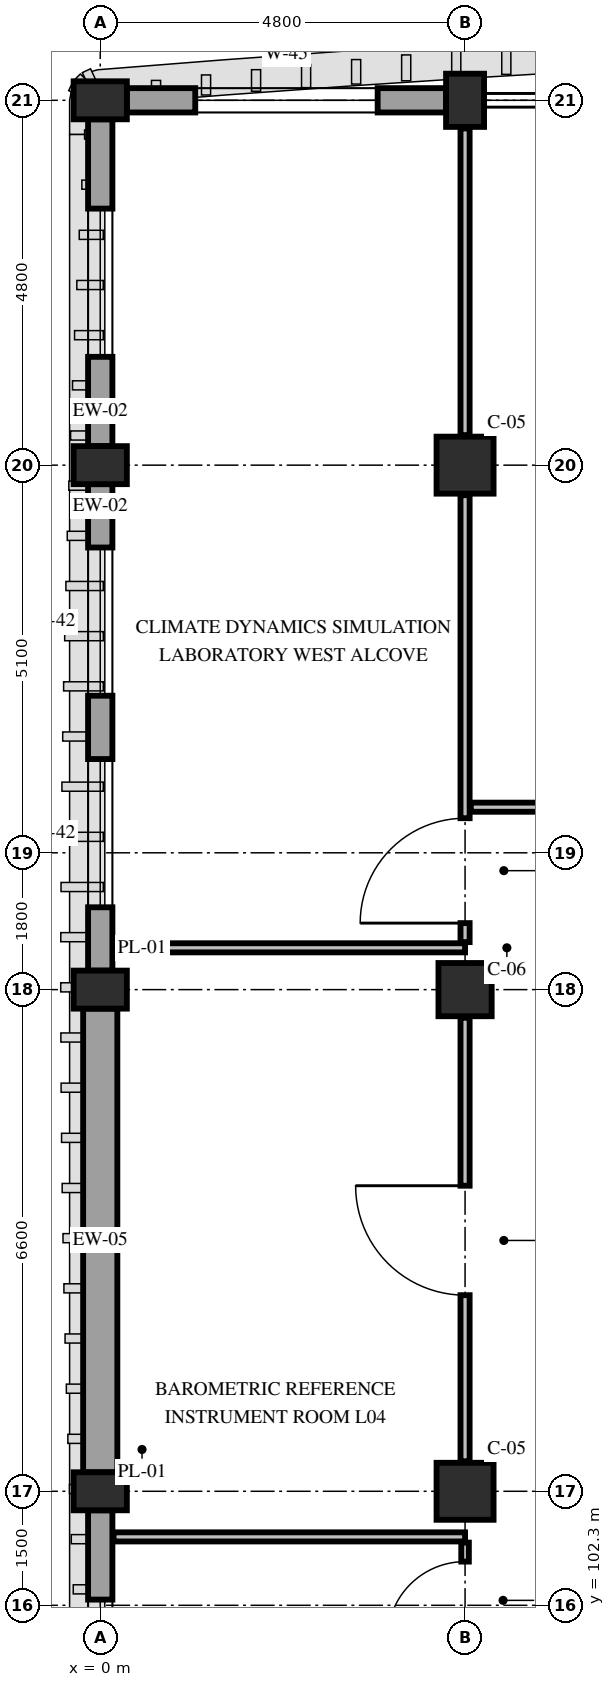
"""IFC4 building model, lengths in metres.
Left out: names, types, materials, properties, quantities, classifications, styles, units other than length and angle.
Written with IfcOpenShell. Run it as: python <this file> out.ifc"""

import sys

from ifc_helpers import new_model, si_unit, direction, frame, frame_2d, origin, origin_2d, place, context, subcontext, project, spatial, rectangle, extrude, element, fill, save


model = new_model("IFC4")
c1 = context("Model", 3, precision=1e-05, world=origin(), true_north=direction((0.0, 1.0)))
c2 = subcontext(c1, "Body", "Model", "MODEL_VIEW")
j1 = project(units=[si_unit("LENGTHUNIT", "METRE"), si_unit("PLANEANGLEUNIT", "RADIAN")], contexts=[c1])
p1 = place(None, origin())
s1 = spatial("IfcSite", under=j1, at=p1, CompositionType="ELEMENT")
p2 = place(p1, origin())
s2 = spatial("IfcBuilding", under=s1, at=p2, CompositionType="ELEMENT")
p3 = place(p2, frame((0.0, 0.0, 19.8)))
s3 = spatial("IfcBuildingStorey", under=s2, at=p3, CompositionType="ELEMENT", Elevation=19.8)
for number, where, z_axis, x_axis in (
    (1, (0.0, 103.8, 0.0), (0.0, 0.0, 1.0), (0.0, 1.0, 0.0)),
    (2, (0.0, 110.4, 0.0), (0.0, 0.0, 1.0), (0.0, 1.0, 0.0)),
    (3, (0.0, 117.3, 0.0), (0.0, 0.0, 1.0), (0.0, 1.0, 0.0)),
    (4, (0.0, 122.1, 0.0), (0.0, 0.0, 1.0), (0.0, 1.0, 0.0)),
):
    element("IfcColumn", number, at=place(p3, frame(where, z_axis=z_axis, x_axis=x_axis)), inside=s3, PredefinedType="PILASTER", context=c2, shape_type="SweptSolid", body=[
        extrude(rectangle(XDim=0.5, YDim=0.7, at=origin_2d()), origin(), (0.0, 0.0, 1.0), 4.8),
    ])
p4 = place(p3, frame((4.8, 103.8, 0.0), z_axis=(0.0, 0.0, 1.0), x_axis=(1.0, 0.0, 0.0)))
e5 = element("IfcColumn", 5, at=p4, inside=s3, PredefinedType="COLUMN", context=c2, shape_type="SweptSolid", body=[
    extrude(rectangle(XDim=0.75, YDim=0.75, at=origin_2d()), origin(), (0.0, 0.0, 1.0), 4.8),
])
p5 = place(p3, frame((4.8, 110.4, 0.0), z_axis=(0.0, 0.0, 1.0), x_axis=(1.0, 0.0, 0.0)))
e6 = element("IfcColumn", 6, at=p5, inside=s3, PredefinedType="COLUMN", context=c2, shape_type="SweptSolid", body=[
    extrude(rectangle(XDim=0.7, YDim=0.7, at=origin_2d()), origin(), (0.0, 0.0, 1.0), 4.8),
])
p6 = place(p3, frame((4.8, 117.3, 0.0), z_axis=(0.0, 0.0, 1.0), x_axis=(1.0, 0.0, 0.0)))
e7 = element("IfcColumn", 7, at=p6, inside=s3, PredefinedType="COLUMN", context=c2, shape_type="SweptSolid", body=[
    extrude(rectangle(XDim=0.75, YDim=0.75, at=origin_2d()), origin(), (0.0, 0.0, 1.0), 4.8),
])
p7 = place(p3, frame((4.8, 122.1, 0.0), z_axis=(0.0, 0.0, 1.0), x_axis=(1.0, 0.0, 0.0)))
e8 = element("IfcColumn", 8, at=p7, inside=s3, PredefinedType="PILASTER", context=c2, shape_type="SweptSolid", body=[
    extrude(rectangle(XDim=0.5, YDim=0.7, at=origin_2d()), origin(), (0.0, 0.0, 1.0), 4.8),
])
p8 = place(p3, frame((0.0, 99.25, 0.0), z_axis=(0.0, 0.0, 1.0), x_axis=(0.0, 1.0, 0.0)))
e9 = element("IfcWall", 9, at=p8, inside=s3, PredefinedType="STANDARD", context=c2, shape_type="SweptSolid", body=[
    extrude(rectangle(XDim=4.3, YDim=0.32, at=frame_2d((2.15, 0.0))), origin(), (0.0, 0.0, 1.0), 3.95),
])
p9 = place(p8, frame((1.175, 0.0, 0.85)))
e10 = element("IfcOpeningElement", 10, at=p9, cuts=e9, PredefinedType="OPENING", context=c2, shape_type="SweptSolid", body=[
    extrude(rectangle(XDim=1.95, YDim=2.24, at=frame_2d((0.975, 1.12))), frame((0.0, 0.175, 0.0), z_axis=(0.0, -1.0, 0.0), x_axis=(1.0, 0.0, 0.0)), (0.0, 0.0, 1.0), 0.35),
])
p10 = place(p3, frame((0.0, 104.05, 0.0), z_axis=(0.0, 0.0, 1.0), x_axis=(0.0, 1.0, 0.0)))
e11 = element("IfcWall", 11, at=p10, inside=s3, PredefinedType="SOLIDWALL", context=c2, shape_type="SweptSolid", body=[
    extrude(rectangle(XDim=6.1, YDim=0.45, at=frame_2d((3.05, 0.0))), origin(), (0.0, 0.0, 1.0), 3.95),
])
p11 = place(p3, frame((0.0, 110.65, 0.0), z_axis=(0.0, 0.0, 1.0), x_axis=(0.0, 1.0, 0.0)))
e12 = element("IfcWall", 12, at=p11, inside=s3, PredefinedType="STANDARD", context=c2, shape_type="SweptSolid", body=[
    extrude(rectangle(XDim=6.4, YDim=0.32, at=frame_2d((3.2, 0.0))), origin(), (0.0, 0.0, 1.0), 3.95),
])
p12 = place(p11, frame((0.833, 0.0, 0.85)))
e13 = element("IfcOpeningElement", 13, at=p12, cuts=e12, PredefinedType="OPENING", context=c2, shape_type="SweptSolid", body=[
    extrude(rectangle(XDim=1.95, YDim=2.24, at=frame_2d((0.975, 1.12))), frame((0.0, 0.175, 0.0), z_axis=(0.0, -1.0, 0.0), x_axis=(1.0, 0.0, 0.0)), (0.0, 0.0, 1.0), 0.35),
])
p13 = place(p11, frame((3.617, 0.0, 0.85)))
e14 = element("IfcOpeningElement", 14, at=p13, cuts=e12, PredefinedType="OPENING", context=c2, shape_type="SweptSolid", body=[
    extrude(rectangle(XDim=1.95, YDim=2.24, at=frame_2d((0.975, 1.12))), frame((0.0, 0.175, 0.0), z_axis=(0.0, -1.0, 0.0), x_axis=(1.0, 0.0, 0.0)), (0.0, 0.0, 1.0), 0.35),
])
p14 = place(p3, frame((0.0, 117.55, 0.0), z_axis=(0.0, 0.0, 1.0), x_axis=(0.0, 1.0, 0.0)))
e15 = element("IfcWall", 15, at=p14, inside=s3, PredefinedType="STANDARD", context=c2, shape_type="SweptSolid", body=[
    extrude(rectangle(XDim=4.3, YDim=0.32, at=frame_2d((2.15, 0.0))), origin(), (0.0, 0.0, 1.0), 3.95),
])
p15 = place(p14, frame((1.175, 0.0, 0.85)))
e16 = element("IfcOpeningElement", 16, at=p15, cuts=e15, PredefinedType="OPENING", context=c2, shape_type="SweptSolid", body=[
    extrude(rectangle(XDim=1.95, YDim=2.24, at=frame_2d((0.975, 1.12))), frame((0.0, 0.175, 0.0), z_axis=(0.0, -1.0, 0.0), x_axis=(1.0, 0.0, 0.0)), (0.0, 0.0, 1.0), 0.35),
])
p16 = place(p3, frame((0.35, 122.1, 0.0), z_axis=(0.0, 0.0, 1.0), x_axis=(1.0, 0.0, 0.0)))
e17 = element("IfcWall", 17, at=p16, inside=s3, PredefinedType="STANDARD", context=c2, shape_type="SweptSolid", body=[
    extrude(rectangle(XDim=4.2, YDim=0.32, at=frame_2d((2.1, 0.0))), origin(), (0.0, 0.0, 1.0), 3.95),
])
p17 = place(p16, frame((0.9, 0.0, 0.85)))
e18 = element("IfcOpeningElement", 18, at=p17, cuts=e17, PredefinedType="OPENING", context=c2, shape_type="SweptSolid", body=[
    extrude(rectangle(XDim=2.4, YDim=2.24, at=frame_2d((1.2, 1.12))), frame((0.0, 0.175, 0.0), z_axis=(0.0, -1.0, 0.0), x_axis=(1.0, 0.0, 0.0)), (0.0, 0.0, 1.0), 0.35),
])
for number, where, z_axis, x_axis in (
    (19, (0.175, 103.2, 0.0), (0.0, 0.0, 1.0), (1.0, 0.0, 0.0)),
    (20, (0.175, 110.95, 0.0), (0.0, 0.0, 1.0), (1.0, 0.0, 0.0)),
):
    element("IfcWall", number, at=place(p3, frame(where, z_axis=z_axis, x_axis=x_axis)), inside=s3, PredefinedType="PARTITIONING", context=c2, shape_type="SweptSolid", body=[
        extrude(rectangle(XDim=4.625, YDim=0.12, at=frame_2d((2.312, 0.0))), origin(), (0.0, 0.0, 1.0), 4.08),
    ])
p18 = place(p3, frame((4.8, 104.195, 0.0), z_axis=(0.0, 0.0, 1.0), x_axis=(0.0, 1.0, 0.0)))
e21 = element("IfcWall", 21, at=p18, inside=s3, PredefinedType="PARTITIONING", context=c2, shape_type="SweptSolid", body=[
    extrude(rectangle(XDim=5.835, YDim=0.12, at=frame_2d((2.917, 0.0))), origin(), (0.0, 0.0, 1.0), 4.13),
])
p19 = place(p18, frame((2.185, 0.0, 0.0)))
e22 = element("IfcOpeningElement", 22, at=p19, cuts=e21, PredefinedType="OPENING", context=c2, shape_type="SweptSolid", body=[
    extrude(rectangle(XDim=1.44, YDim=2.25, at=frame_2d((0.72, 1.125))), frame((0.0, 0.075, 0.0), z_axis=(0.0, -1.0, 0.0), x_axis=(1.0, 0.0, 0.0)), (0.0, 0.0, 1.0), 0.15),
])
p20 = place(p3, frame((4.8, 111.025, 0.0), z_axis=(0.0, 0.0, 1.0), x_axis=(0.0, 1.0, 0.0)))
e23 = element("IfcWall", 23, at=p20, inside=s3, PredefinedType="PARTITIONING", context=c2, shape_type="SweptSolid", body=[
    extrude(rectangle(XDim=5.88, YDim=0.12, at=frame_2d((2.94, 0.0))), origin(), (0.0, 0.0, 1.0), 4.13),
])
p21 = place(p20, frame((0.25, 0.0, 0.0)))
e24 = element("IfcOpeningElement", 24, at=p21, cuts=e23, PredefinedType="OPENING", context=c2, shape_type="SweptSolid", body=[
    extrude(rectangle(XDim=1.38, YDim=2.25, at=frame_2d((0.69, 1.125))), frame((0.0, 0.075, 0.0), z_axis=(0.0, -1.0, 0.0), x_axis=(1.0, 0.0, 0.0)), (0.0, 0.0, 1.0), 0.15),
])
p22 = place(p3, frame((4.8, 117.695, 0.0), z_axis=(0.0, 0.0, 1.0), x_axis=(0.0, 1.0, 0.0)))
e25 = element("IfcWall", 25, at=p22, inside=s3, PredefinedType="PARTITIONING", context=c2, shape_type="SweptSolid", body=[
    extrude(rectangle(XDim=4.035, YDim=0.12, at=frame_2d((2.018, 0.0))), origin(), (0.0, 0.0, 1.0), 4.13),
])
p23 = place(p3, frame((4.875, 112.8, 0.0), z_axis=(0.0, 0.0, 1.0), x_axis=(1.0, 0.0, 0.0)))
e26 = element("IfcWall", 26, at=p23, inside=s3, PredefinedType="PARTITIONING", context=c2, shape_type="SweptSolid", body=[
    extrude(rectangle(XDim=13.325, YDim=0.12, at=frame_2d((6.663, 0.0))), origin(), (0.0, 0.0, 1.0), 4.13),
])
p24 = place(p23, frame((5.965, 0.0, 0.0)))
e27 = element("IfcOpeningElement", 27, at=p24, cuts=e26, PredefinedType="OPENING", context=c2, shape_type="SweptSolid", body=[
    extrude(rectangle(XDim=1.32, YDim=2.2, at=frame_2d((0.66, 1.1))), frame((0.0, 0.075, 0.0), z_axis=(0.0, -1.0, 0.0), x_axis=(1.0, 0.0, 0.0)), (0.0, 0.0, 1.0), 0.15),
])
p25 = place(p3, frame((4.8, 99.37, 0.0), z_axis=(0.0, 0.0, 1.0), x_axis=(0.0, 1.0, 0.0)))
e28 = element("IfcWall", 28, at=p25, inside=s3, PredefinedType="PARTITIONING", context=c2, shape_type="SweptSolid", body=[
    extrude(rectangle(XDim=3.755, YDim=0.1, at=frame_2d((1.877, 0.0))), origin(), (0.0, 0.0, 1.0), 4.13),
])
p26 = place(p25, frame((2.485, 0.0, 0.0)))
e29 = element("IfcOpeningElement", 29, at=p26, cuts=e28, PredefinedType="OPENING", context=c2, shape_type="SweptSolid", body=[
    extrude(rectangle(XDim=1.02, YDim=2.2, at=frame_2d((0.51, 1.1))), frame((0.0, 0.065, 0.0), z_axis=(0.0, -1.0, 0.0), x_axis=(1.0, 0.0, 0.0)), (0.0, 0.0, 1.0), 0.13),
])
p27 = place(p9, origin())
e30 = element("IfcWindow", 30, at=p27, inside=s3, PartitioningType="DOUBLE_PANEL_VERTICAL", PredefinedType="WINDOW", context=c2, shape_type="SweptSolid", body=[
    extrude(rectangle(XDim=1.95, YDim=2.24, at=frame_2d((0.975, 1.12))), frame((0.0, 0.03, 0.0), z_axis=(0.0, -1.0, 0.0), x_axis=(1.0, 0.0, 0.0)), (0.0, 0.0, 1.0), 0.06),
])
fill(e10, e30)
p28 = place(p12, origin())
e31 = element("IfcWindow", 31, at=p28, inside=s3, PartitioningType="DOUBLE_PANEL_VERTICAL", PredefinedType="WINDOW", context=c2, shape_type="SweptSolid", body=[
    extrude(rectangle(XDim=1.95, YDim=2.24, at=frame_2d((0.975, 1.12))), frame((0.0, 0.03, 0.0), z_axis=(0.0, -1.0, 0.0), x_axis=(1.0, 0.0, 0.0)), (0.0, 0.0, 1.0), 0.06),
])
fill(e13, e31)
p29 = place(p13, origin())
e32 = element("IfcWindow", 32, at=p29, inside=s3, PartitioningType="DOUBLE_PANEL_VERTICAL", PredefinedType="WINDOW", context=c2, shape_type="SweptSolid", body=[
    extrude(rectangle(XDim=1.95, YDim=2.24, at=frame_2d((0.975, 1.12))), frame((0.0, 0.03, 0.0), z_axis=(0.0, -1.0, 0.0), x_axis=(1.0, 0.0, 0.0)), (0.0, 0.0, 1.0), 0.06),
])
fill(e14, e32)
p30 = place(p15, origin())
e33 = element("IfcWindow", 33, at=p30, inside=s3, PartitioningType="DOUBLE_PANEL_VERTICAL", PredefinedType="WINDOW", context=c2, shape_type="SweptSolid", body=[
    extrude(rectangle(XDim=1.95, YDim=2.24, at=frame_2d((0.975, 1.12))), frame((0.0, 0.03, 0.0), z_axis=(0.0, -1.0, 0.0), x_axis=(1.0, 0.0, 0.0)), (0.0, 0.0, 1.0), 0.06),
])
fill(e16, e33)
p31 = place(p17, origin())
e34 = element("IfcWindow", 34, at=p31, inside=s3, PartitioningType="DOUBLE_PANEL_VERTICAL", PredefinedType="WINDOW", context=c2, shape_type="SweptSolid", body=[
    extrude(rectangle(XDim=2.4, YDim=2.24, at=frame_2d((1.2, 1.12))), frame((0.0, 0.03, 0.0), z_axis=(0.0, -1.0, 0.0), x_axis=(1.0, 0.0, 0.0)), (0.0, 0.0, 1.0), 0.06),
])
fill(e18, e34)
p32 = place(p19, origin())
e35 = element("IfcDoor", 35, at=p32, inside=s3, OperationType="SINGLE_SWING_RIGHT", PredefinedType="DOOR", context=c2, shape_type="SweptSolid", body=[
    extrude(rectangle(XDim=1.44, YDim=2.25, at=frame_2d((0.72, 1.125))), frame((0.0, 0.025, 0.0), z_axis=(0.0, -1.0, 0.0), x_axis=(1.0, 0.0, 0.0)), (0.0, 0.0, 1.0), 0.05),
])
fill(e22, e35)
p33 = place(p21, origin())
e36 = element("IfcDoor", 36, at=p33, inside=s3, OperationType="SINGLE_SWING_LEFT", PredefinedType="DOOR", context=c2, shape_type="SweptSolid", body=[
    extrude(rectangle(XDim=1.38, YDim=2.25, at=frame_2d((0.69, 1.125))), frame((0.0, 0.025, 0.0), z_axis=(0.0, -1.0, 0.0), x_axis=(1.0, 0.0, 0.0)), (0.0, 0.0, 1.0), 0.05),
])
fill(e24, e36)
p34 = place(p26, origin())
e37 = element("IfcDoor", 37, at=p34, inside=s3, OperationType="SINGLE_SWING_LEFT", PredefinedType="DOOR", context=c2, shape_type="SweptSolid", body=[
    extrude(rectangle(XDim=1.02, YDim=2.2, at=frame_2d((0.51, 1.1))), frame((0.0, 0.025, 0.0), z_axis=(0.0, -1.0, 0.0), x_axis=(1.0, 0.0, 0.0)), (0.0, 0.0, 1.0), 0.05),
])
fill(e29, e37)
save(model, sys.argv[1])
